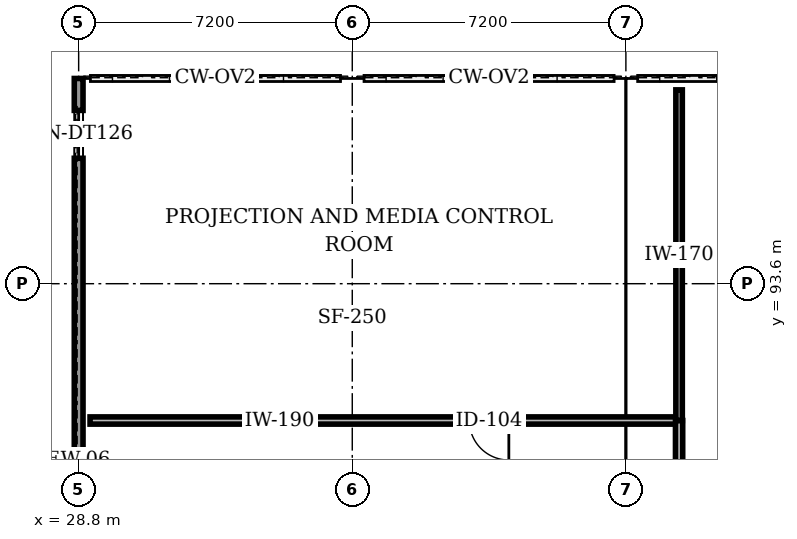
"""IFC4 building model, lengths in metres.
Left out: names, types, materials, properties, quantities, classifications, styles, units other than length and angle.
Written with IfcOpenShell. Run it as: python <this file> out.ifc"""

import sys

from ifc_helpers import new_model, si_unit, direction, frame, frame_2d, origin, place, context, subcontext, project, spatial, rectangle, extrude, element, fill, save


model = new_model("IFC4")
c1 = context("Model", 3, precision=1e-05, world=origin(), true_north=direction((0.0, 1.0)))
c2 = subcontext(c1, "Body", "Model", "MODEL_VIEW")
j1 = project(units=[si_unit("LENGTHUNIT", "METRE"), si_unit("PLANEANGLEUNIT", "RADIAN")], contexts=[c1])
p1 = place(None, origin())
s1 = spatial("IfcSite", under=j1, at=p1, CompositionType="ELEMENT")
p2 = place(p1, origin())
s2 = spatial("IfcBuilding", under=s1, at=p2, CompositionType="ELEMENT")
p3 = place(p2, frame((0.0, 0.0, 14.4)))
s3 = spatial("IfcBuildingStorey", under=s2, at=p3, CompositionType="ELEMENT", Elevation=14.4)
p4 = place(p3, frame((28.8, 99.0, 0.0), z_axis=(0.0, 0.0, 1.0), x_axis=(0.0, -1.0, 0.0)))
e1 = element("IfcWall", 1, at=p4, inside=s3, PredefinedType="STANDARD", context=c2, shape_type="SweptSolid", body=[
    extrude(rectangle(XDim=41.4, YDim=0.23, at=frame_2d((20.7, 0.0))), origin(), (0.0, 0.0, 1.0), 2.42),
])
p5 = place(p4, frame((32.39, 0.0, 0.95)))
e2 = element("IfcOpeningElement", 2, at=p5, cuts=e1, PredefinedType="OPENING", context=c2, shape_type="SweptSolid", body=[
    extrude(rectangle(XDim=1.26, YDim=1.38, at=frame_2d((0.63, 0.69))), frame((0.0, 0.125, 0.0), z_axis=(0.0, -1.0, 0.0), x_axis=(1.0, 0.0, 0.0)), (0.0, 0.0, 1.0), 0.25),
])
p6 = place(p4, frame((25.19, 0.0, 0.95)))
e3 = element("IfcOpeningElement", 3, at=p6, cuts=e1, PredefinedType="OPENING", context=c2, shape_type="SweptSolid", body=[
    extrude(rectangle(XDim=1.26, YDim=1.38, at=frame_2d((0.63, 0.69))), frame((0.0, 0.125, 0.0), z_axis=(0.0, -1.0, 0.0), x_axis=(1.0, 0.0, 0.0)), (0.0, 0.0, 1.0), 0.25),
])
p7 = place(p4, frame((17.99, 0.0, 0.95)))
e4 = element("IfcOpeningElement", 4, at=p7, cuts=e1, PredefinedType="OPENING", context=c2, shape_type="SweptSolid", body=[
    extrude(rectangle(XDim=1.26, YDim=1.38, at=frame_2d((0.63, 0.69))), frame((0.0, 0.125, 0.0), z_axis=(0.0, -1.0, 0.0), x_axis=(1.0, 0.0, 0.0)), (0.0, 0.0, 1.0), 0.25),
])
p8 = place(p4, frame((0.84, 0.0, 0.95)))
e5 = element("IfcOpeningElement", 5, at=p8, cuts=e1, PredefinedType="OPENING", context=c2, shape_type="SweptSolid", body=[
    extrude(rectangle(XDim=1.26, YDim=1.38, at=frame_2d((0.63, 0.69))), frame((0.0, 0.125, 0.0), z_axis=(0.0, -1.0, 0.0), x_axis=(1.0, 0.0, 0.0)), (0.0, 0.0, 1.0), 0.25),
])
p9 = place(p3, frame((44.6, 90.0, 0.0), z_axis=(0.0, 0.0, 1.0), x_axis=(-1.0, 0.0, 0.0)))
e6 = element("IfcWall", 6, at=p9, inside=s3, PredefinedType="STANDARD", context=c2, shape_type="SweptSolid", body=[
    extrude(rectangle(XDim=15.5, YDim=0.19, at=frame_2d((7.75, 0.0))), origin(), (0.0, 0.0, 1.0), 2.478),
])
p10 = place(p9, frame((4.48, 0.0, 0.0)))
e7 = element("IfcOpeningElement", 7, at=p10, cuts=e6, PredefinedType="OPENING", context=c2, shape_type="SweptSolid", body=[
    extrude(rectangle(XDim=1.04, YDim=2.16, at=frame_2d((0.52, 1.08))), frame((0.0, 0.105, 0.0), z_axis=(0.0, -1.0, 0.0), x_axis=(1.0, 0.0, 0.0)), (0.0, 0.0, 1.0), 0.21),
])
p11 = place(p3, frame((44.6, 68.8, 0.0), z_axis=(0.0, 0.0, 1.0), x_axis=(0.0, 1.0, 0.0)))
e8 = element("IfcWall", 8, at=p11, inside=s3, PredefinedType="STANDARD", context=c2, shape_type="SweptSolid", body=[
    extrude(rectangle(XDim=21.2, YDim=0.19, at=frame_2d((10.6, 0.0))), origin(), (0.0, 0.0, 1.0), 2.802),
])
p12 = place(p3, frame((44.6, 90.0, 0.0), z_axis=(0.0, 0.0, 1.0), x_axis=(0.0, 1.0, 0.0)))
e9 = element("IfcWall", 9, at=p12, inside=s3, PredefinedType="STANDARD", context=c2, shape_type="SweptSolid", body=[
    extrude(rectangle(XDim=8.7, YDim=0.17, at=frame_2d((4.35, 0.0))), origin(), (0.0, 0.0, 1.0), 2.697),
])
p13 = place(p8, origin())
e10 = element("IfcWindow", 10, at=p13, inside=s3, PartitioningType="SINGLE_PANEL", PredefinedType="WINDOW", context=c2, shape_type="SweptSolid", body=[
    extrude(rectangle(XDim=1.26, YDim=1.38, at=frame_2d((0.63, 0.69))), frame((0.0, 0.03, 0.0), z_axis=(0.0, -1.0, 0.0), x_axis=(1.0, 0.0, 0.0)), (0.0, 0.0, 1.0), 0.06),
])
fill(e5, e10)
p14 = place(p10, origin())
e11 = element("IfcDoor", 11, at=p14, inside=s3, OperationType="SINGLE_SWING_LEFT", PredefinedType="DOOR", context=c2, shape_type="SweptSolid", body=[
    extrude(rectangle(XDim=1.04, YDim=2.16, at=frame_2d((0.52, 1.08))), frame((0.0, 0.025, 0.0), z_axis=(0.0, -1.0, 0.0), x_axis=(1.0, 0.0, 0.0)), (0.0, 0.0, 1.0), 0.05),
])
fill(e7, e11)
save(model, sys.argv[1])
